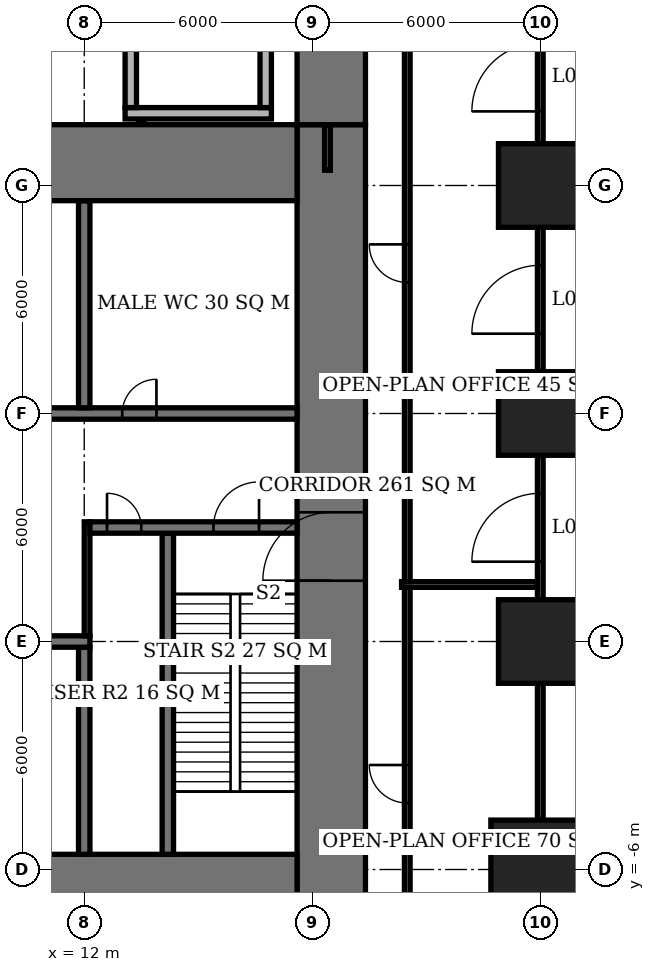
"""IFC4 building model, lengths in metres.
Left out: names, types, materials, properties, quantities, classifications, styles, units other than length and angle.
Written with IfcOpenShell. Run it as: python <this file> out.ifc"""

import sys

from ifc_helpers import new_model, si_unit, direction, frame, frame_2d, origin, origin_2d, place, context, subcontext, project, spatial, rectangle, extrude, element, fill, save


model = new_model("IFC4")
c1 = context("Model", 3, precision=1e-05, world=origin(), true_north=direction((0.0, 1.0)))
c2 = subcontext(c1, "Body", "Model", "MODEL_VIEW")
j1 = project(units=[si_unit("LENGTHUNIT", "METRE"), si_unit("PLANEANGLEUNIT", "RADIAN")], contexts=[c1])
p1 = place(None, origin())
s1 = spatial("IfcSite", under=j1, at=p1, CompositionType="ELEMENT")
p2 = place(p1, origin())
s2 = spatial("IfcBuilding", under=s1, at=p2, CompositionType="ELEMENT")
p3 = place(p2, frame((0.0, 0.0, 11.0)))
s3 = spatial("IfcBuildingStorey", under=s2, at=p3, CompositionType="ELEMENT", Elevation=11.0)
p4 = place(p3, frame((24.0, -6.0, 0.0), z_axis=(0.0, 0.0, 1.0), x_axis=(1.0, 0.0, 0.0)))
e1 = element("IfcColumn", 1, at=p4, inside=s3, PredefinedType="COLUMN", context=c2, shape_type="SweptSolid", body=[
    extrude(rectangle(XDim=2.6, YDim=2.6, at=origin_2d()), origin(), (0.0, 0.0, 1.0), 7.2),
])
for number, where, z_axis, x_axis in (
    (2, (24.0, 0.0, 0.0), (0.0, 0.0, 1.0), (1.0, 0.0, 0.0)),
    (3, (24.0, 6.0, 0.0), (0.0, 0.0, 1.0), (1.0, 0.0, 0.0)),
    (4, (24.0, 12.0, 0.0), (0.0, 0.0, 1.0), (1.0, 0.0, 0.0)),
):
    element("IfcColumn", number, at=place(p3, frame(where, z_axis=z_axis, x_axis=x_axis)), inside=s3, PredefinedType="COLUMN", context=c2, shape_type="SweptSolid", body=[
        extrude(rectangle(XDim=2.2, YDim=2.2, at=origin_2d()), origin(), (0.0, 0.0, 1.0), 7.2),
    ])
for number, where, z_axis, x_axis in (
    (5, (-5.6, -6.6, 0.0), (0.0, 0.0, 1.0), (1.0, 0.0, 0.0)),
    (6, (-5.6, 12.6, 0.0), (0.0, 0.0, 1.0), (1.0, 0.0, 0.0)),
):
    element("IfcWall", number, at=place(p3, frame(where, z_axis=z_axis, x_axis=x_axis)), inside=s3, PredefinedType="SHEAR", context=c2, shape_type="SweptSolid", body=[
        extrude(rectangle(XDim=23.2, YDim=2.0, at=frame_2d((11.6, 0.0))), origin(), (0.0, 0.0, 1.0), 7.2),
    ])
p5 = place(p3, frame((18.5, -7.6, 0.0), z_axis=(0.0, 0.0, 1.0), x_axis=(0.0, 1.0, 0.0)))
e7 = element("IfcWall", 7, at=p5, inside=s3, PredefinedType="SHEAR", context=c2, shape_type="SweptSolid", body=[
    extrude(rectangle(XDim=21.2, YDim=1.8, at=frame_2d((10.6, 0.0))), origin(), (0.0, 0.0, 1.0), 7.2),
])
p6 = place(p5, frame((9.2, 0.0, 0.0)))
e8 = element("IfcOpeningElement", 8, at=p6, cuts=e7, PredefinedType="OPENING", context=c2, shape_type="SweptSolid", body=[
    extrude(rectangle(XDim=1.8, YDim=2.4, at=frame_2d((0.9, 1.2))), frame((0.0, 0.91, 0.0), z_axis=(0.0, -1.0, 0.0), x_axis=(1.0, 0.0, 0.0)), (0.0, 0.0, 1.0), 1.82),
])
p7 = place(p3, frame((18.5, 13.6, 0.0), z_axis=(0.0, 0.0, 1.0), x_axis=(0.0, 1.0, 0.0)))
e9 = element("IfcWall", 9, at=p7, inside=s3, PredefinedType="SHEAR", context=c2, shape_type="SweptSolid", body=[
    extrude(rectangle(XDim=2.4, YDim=1.8, at=frame_2d((1.2, 0.0))), origin(), (0.0, 0.0, 1.0), 7.2),
])
p8 = place(p3, frame((-5.6, 0.0, 0.0), z_axis=(0.0, 0.0, 1.0), x_axis=(1.0, 0.0, 0.0)))
e10 = element("IfcWall", 10, at=p8, inside=s3, PredefinedType="SHEAR", context=c2, shape_type="SweptSolid", body=[
    extrude(rectangle(XDim=17.75, YDim=0.3, at=frame_2d((8.875, 0.0))), origin(), (0.0, 0.0, 1.0), 7.2),
])
p9 = place(p8, frame((0.6, 0.0, 0.0)))
e11 = element("IfcOpeningElement", 11, at=p9, cuts=e10, PredefinedType="OPENING", context=c2, shape_type="SweptSolid", body=[
    extrude(rectangle(XDim=0.9, YDim=2.1, at=frame_2d((0.45, 1.05))), frame((0.0, 0.16, 0.0), z_axis=(0.0, -1.0, 0.0), x_axis=(1.0, 0.0, 0.0)), (0.0, 0.0, 1.0), 0.32),
])
p10 = place(p8, frame((3.7, 0.0, 0.0)))
e12 = element("IfcOpeningElement", 12, at=p10, cuts=e10, PredefinedType="OPENING", context=c2, shape_type="SweptSolid", body=[
    extrude(rectangle(XDim=1.0, YDim=2.1, at=frame_2d((0.5, 1.05))), frame((0.0, 0.16, 0.0), z_axis=(0.0, -1.0, 0.0), x_axis=(1.0, 0.0, 0.0)), (0.0, 0.0, 1.0), 0.32),
])
p11 = place(p3, frame((12.15, 3.0, 0.0), z_axis=(0.0, 0.0, 1.0), x_axis=(1.0, 0.0, 0.0)))
e13 = element("IfcWall", 13, at=p11, inside=s3, PredefinedType="SHEAR", context=c2, shape_type="SweptSolid", body=[
    extrude(rectangle(XDim=5.45, YDim=0.3, at=frame_2d((2.725, 0.0))), origin(), (0.0, 0.0, 1.0), 7.2),
])
p12 = place(p11, frame((3.25, 0.0, 0.0)))
e14 = element("IfcOpeningElement", 14, at=p12, cuts=e13, PredefinedType="OPENING", context=c2, shape_type="SweptSolid", body=[
    extrude(rectangle(XDim=1.2, YDim=2.1, at=frame_2d((0.6, 1.05))), frame((0.0, 0.16, 0.0), z_axis=(0.0, -1.0, 0.0), x_axis=(1.0, 0.0, 0.0)), (0.0, 0.0, 1.0), 0.32),
])
p13 = place(p11, frame((0.45, 0.0, 0.0)))
e15 = element("IfcOpeningElement", 15, at=p13, cuts=e13, PredefinedType="OPENING", context=c2, shape_type="SweptSolid", body=[
    extrude(rectangle(XDim=0.9, YDim=2.1, at=frame_2d((0.45, 1.05))), frame((0.0, 0.16, 0.0), z_axis=(0.0, -1.0, 0.0), x_axis=(1.0, 0.0, 0.0)), (0.0, 0.0, 1.0), 0.32),
])
p14 = place(p3, frame((-0.15, 6.0, 0.0), z_axis=(0.0, 0.0, 1.0), x_axis=(1.0, 0.0, 0.0)))
e16 = element("IfcWall", 16, at=p14, inside=s3, PredefinedType="SHEAR", context=c2, shape_type="SweptSolid", body=[
    extrude(rectangle(XDim=17.75, YDim=0.3, at=frame_2d((8.875, 0.0))), origin(), (0.0, 0.0, 1.0), 7.2),
])
p15 = place(p14, frame((13.15, 0.0, 0.0)))
e17 = element("IfcOpeningElement", 17, at=p15, cuts=e16, PredefinedType="OPENING", context=c2, shape_type="SweptSolid", body=[
    extrude(rectangle(XDim=0.9, YDim=2.1, at=frame_2d((0.45, 1.05))), frame((0.0, 0.16, 0.0), z_axis=(0.0, -1.0, 0.0), x_axis=(1.0, 0.0, 0.0)), (0.0, 0.0, 1.0), 0.32),
])
p16 = place(p14, frame((1.1, 0.0, 0.0)))
e18 = element("IfcOpeningElement", 18, at=p16, cuts=e16, PredefinedType="OPENING", context=c2, shape_type="SweptSolid", body=[
    extrude(rectangle(XDim=1.1, YDim=2.1, at=frame_2d((0.55, 1.05))), frame((0.0, 0.16, 0.0), z_axis=(0.0, -1.0, 0.0), x_axis=(1.0, 0.0, 0.0)), (0.0, 0.0, 1.0), 0.32),
])
p17 = place(p14, frame((4.1, 0.0, 0.0)))
e19 = element("IfcOpeningElement", 19, at=p17, cuts=e16, PredefinedType="OPENING", context=c2, shape_type="SweptSolid", body=[
    extrude(rectangle(XDim=1.1, YDim=2.1, at=frame_2d((0.55, 1.05))), frame((0.0, 0.16, 0.0), z_axis=(0.0, -1.0, 0.0), x_axis=(1.0, 0.0, 0.0)), (0.0, 0.0, 1.0), 0.32),
])
p18 = place(p14, frame((7.1, 0.0, 0.0)))
e20 = element("IfcOpeningElement", 20, at=p18, cuts=e16, PredefinedType="OPENING", context=c2, shape_type="SweptSolid", body=[
    extrude(rectangle(XDim=1.1, YDim=2.1, at=frame_2d((0.55, 1.05))), frame((0.0, 0.16, 0.0), z_axis=(0.0, -1.0, 0.0), x_axis=(1.0, 0.0, 0.0)), (0.0, 0.0, 1.0), 0.32),
])
p19 = place(p14, frame((10.1, 0.0, 0.0)))
e21 = element("IfcOpeningElement", 21, at=p19, cuts=e16, PredefinedType="OPENING", context=c2, shape_type="SweptSolid", body=[
    extrude(rectangle(XDim=1.1, YDim=2.1, at=frame_2d((0.55, 1.05))), frame((0.0, 0.16, 0.0), z_axis=(0.0, -1.0, 0.0), x_axis=(1.0, 0.0, 0.0)), (0.0, 0.0, 1.0), 0.32),
])
for number, where, z_axis, x_axis in (
    (22, (12.0, -5.6, 0.0), (0.0, 0.0, 1.0), (0.0, 1.0, 0.0)),
    (23, (12.0, 6.15, 0.0), (0.0, 0.0, 1.0), (0.0, 1.0, 0.0)),
):
    element("IfcWall", number, at=place(p3, frame(where, z_axis=z_axis, x_axis=x_axis)), inside=s3, PredefinedType="SHEAR", context=c2, shape_type="SweptSolid", body=[
        extrude(rectangle(XDim=5.45, YDim=0.3, at=frame_2d((2.725, 0.0))), origin(), (0.0, 0.0, 1.0), 7.2),
    ])
p20 = place(p3, frame((14.2, -5.6, 0.0), z_axis=(0.0, 0.0, 1.0), x_axis=(0.0, 1.0, 0.0)))
e24 = element("IfcWall", 24, at=p20, inside=s3, PredefinedType="SHEAR", context=c2, shape_type="SweptSolid", body=[
    extrude(rectangle(XDim=8.45, YDim=0.3, at=frame_2d((4.225, 0.0))), origin(), (0.0, 0.0, 1.0), 7.2),
])
p21 = place(p3, frame((13.075, 13.9, 0.0), z_axis=(0.0, 0.0, 1.0), x_axis=(1.0, 0.0, 0.0)))
e25 = element("IfcWall", 25, at=p21, inside=s3, PredefinedType="PARTITIONING", context=c2, shape_type="SweptSolid", body=[
    extrude(rectangle(XDim=3.85, YDim=0.3, at=frame_2d((1.925, 0.0))), origin(), (0.0, 0.0, 1.0), 6.95),
])
for number, where, z_axis, x_axis in (
    (26, (13.225, 14.05, 0.0), (0.0, 0.0, 1.0), (0.0, 1.0, 0.0)),
    (27, (16.775, 14.05, 0.0), (0.0, 0.0, 1.0), (0.0, 1.0, 0.0)),
):
    element("IfcWall", number, at=place(p3, frame(where, z_axis=z_axis, x_axis=x_axis)), inside=s3, PredefinedType="PARTITIONING", context=c2, shape_type="SweptSolid", body=[
        extrude(rectangle(XDim=8.0, YDim=0.3, at=frame_2d((4.0, 0.0))), origin(), (0.0, 0.0, 1.0), 6.95),
    ])
p22 = place(p3, frame((24.0, -4.7, 0.0), z_axis=(0.0, 0.0, 1.0), x_axis=(0.0, 1.0, 0.0)))
e28 = element("IfcWall", 28, at=p22, inside=s3, PredefinedType="PARTITIONING", context=c2, shape_type="SweptSolid", body=[
    extrude(rectangle(XDim=3.6, YDim=0.15, at=frame_2d((1.8, 0.0))), origin(), (0.0, 0.0, 1.0), 6.8),
])
p23 = place(p3, frame((24.0, 1.1, 0.0), z_axis=(0.0, 0.0, 1.0), x_axis=(0.0, 1.0, 0.0)))
e29 = element("IfcWall", 29, at=p23, inside=s3, PredefinedType="PARTITIONING", context=c2, shape_type="SweptSolid", body=[
    extrude(rectangle(XDim=3.8, YDim=0.15, at=frame_2d((1.9, 0.0))), origin(), (0.0, 0.0, 1.0), 6.8),
])
p24 = place(p23, frame((1.0, 0.0, 0.0)))
e30 = element("IfcOpeningElement", 30, at=p24, cuts=e29, PredefinedType="OPENING", context=c2, shape_type="SweptSolid", body=[
    extrude(rectangle(XDim=1.8, YDim=2.4, at=frame_2d((0.9, 1.2))), frame((0.0, 0.085, 0.0), z_axis=(0.0, -1.0, 0.0), x_axis=(1.0, 0.0, 0.0)), (0.0, 0.0, 1.0), 0.17),
])
p25 = place(p3, frame((24.0, 7.1, 0.0), z_axis=(0.0, 0.0, 1.0), x_axis=(0.0, 1.0, 0.0)))
e31 = element("IfcWall", 31, at=p25, inside=s3, PredefinedType="PARTITIONING", context=c2, shape_type="SweptSolid", body=[
    extrude(rectangle(XDim=3.8, YDim=0.15, at=frame_2d((1.9, 0.0))), origin(), (0.0, 0.0, 1.0), 6.8),
])
p26 = place(p25, frame((1.0, 0.0, 0.0)))
e32 = element("IfcOpeningElement", 32, at=p26, cuts=e31, PredefinedType="OPENING", context=c2, shape_type="SweptSolid", body=[
    extrude(rectangle(XDim=1.8, YDim=2.4, at=frame_2d((0.9, 1.2))), frame((0.0, 0.085, 0.0), z_axis=(0.0, -1.0, 0.0), x_axis=(1.0, 0.0, 0.0)), (0.0, 0.0, 1.0), 0.17),
])
p27 = place(p3, frame((24.0, 13.1, 0.0), z_axis=(0.0, 0.0, 1.0), x_axis=(0.0, 1.0, 0.0)))
e33 = element("IfcWall", 33, at=p27, inside=s3, PredefinedType="PARTITIONING", context=c2, shape_type="SweptSolid", body=[
    extrude(rectangle(XDim=3.5, YDim=0.15, at=frame_2d((1.75, 0.0))), origin(), (0.0, 0.0, 1.0), 6.8),
])
p28 = place(p27, frame((0.85, 0.0, 0.0)))
e34 = element("IfcOpeningElement", 34, at=p28, cuts=e33, PredefinedType="OPENING", context=c2, shape_type="SweptSolid", body=[
    extrude(rectangle(XDim=1.8, YDim=2.4, at=frame_2d((0.9, 1.2))), frame((0.0, 0.085, 0.0), z_axis=(0.0, -1.0, 0.0), x_axis=(1.0, 0.0, 0.0)), (0.0, 0.0, 1.0), 0.17),
])
p29 = place(p3, frame((13.5, 12.4, 0.0), z_axis=(0.0, 0.0, 1.0), x_axis=(0.0, 1.0, 0.0)))
e35 = element("IfcWall", 35, at=p29, inside=s3, PredefinedType="PARTITIONING", context=c2, shape_type="SweptSolid", body=[
    extrude(rectangle(XDim=1.35, YDim=0.15, at=frame_2d((0.675, 0.0))), origin(), (0.0, 0.0, 1.0), 6.95),
])
p30 = place(p3, frame((18.4, 12.4, 0.0), z_axis=(0.0, 0.0, 1.0), x_axis=(0.0, 1.0, 0.0)))
e36 = element("IfcWall", 36, at=p30, inside=s3, PredefinedType="PARTITIONING", context=c2, shape_type="SweptSolid", body=[
    extrude(rectangle(XDim=1.2, YDim=0.15, at=frame_2d((0.6, 0.0))), origin(), (0.0, 0.0, 1.0), 6.95),
])
p31 = place(p3, frame((20.5, -13.425, 0.0), z_axis=(0.0, 0.0, 1.0), x_axis=(0.0, 1.0, 0.0)))
e37 = element("IfcWall", 37, at=p31, inside=s3, PredefinedType="PARTITIONING", context=c2, shape_type="SweptSolid", body=[
    extrude(rectangle(XDim=14.85, YDim=0.15, at=frame_2d((7.425, 0.0))), origin(), (0.0, 0.0, 1.0), 6.95),
])
p32 = place(p31, frame((9.175, 0.0, 0.0)))
e38 = element("IfcOpeningElement", 38, at=p32, cuts=e37, PredefinedType="OPENING", context=c2, shape_type="SweptSolid", body=[
    extrude(rectangle(XDim=1.0, YDim=2.1, at=frame_2d((0.5, 1.05))), frame((0.0, 0.085, 0.0), z_axis=(0.0, -1.0, 0.0), x_axis=(1.0, 0.0, 0.0)), (0.0, 0.0, 1.0), 0.17),
])
p33 = place(p3, frame((20.5, 1.575, 0.0), z_axis=(0.0, 0.0, 1.0), x_axis=(0.0, 1.0, 0.0)))
e39 = element("IfcWall", 39, at=p33, inside=s3, PredefinedType="PARTITIONING", context=c2, shape_type="SweptSolid", body=[
    extrude(rectangle(XDim=14.95, YDim=0.15, at=frame_2d((7.475, 0.0))), origin(), (0.0, 0.0, 1.0), 6.95),
])
p34 = place(p33, frame((7.875, 0.0, 0.0)))
e40 = element("IfcOpeningElement", 40, at=p34, cuts=e39, PredefinedType="OPENING", context=c2, shape_type="SweptSolid", body=[
    extrude(rectangle(XDim=1.0, YDim=2.1, at=frame_2d((0.5, 1.05))), frame((0.0, 0.085, 0.0), z_axis=(0.0, -1.0, 0.0), x_axis=(1.0, 0.0, 0.0)), (0.0, 0.0, 1.0), 0.17),
])
p35 = place(p3, frame((20.35, 1.5, 0.0), z_axis=(0.0, 0.0, 1.0), x_axis=(1.0, 0.0, 0.0)))
e41 = element("IfcWall", 41, at=p35, inside=s3, PredefinedType="PARTITIONING", context=c2, shape_type="SweptSolid", body=[
    extrude(rectangle(XDim=3.575, YDim=0.15, at=frame_2d((1.788, 0.0))), origin(), (0.0, 0.0, 1.0), 6.95),
])
p36 = place(p3, frame((12.075, 0.15, 0.0), z_axis=(0.0, 0.0, 1.0), x_axis=(0.0, 1.0, 0.0)))
e42 = element("IfcWall", 42, at=p36, inside=s3, PredefinedType="PARTITIONING", context=c2, shape_type="SweptSolid", body=[
    extrude(rectangle(XDim=3.0, YDim=0.15, at=frame_2d((1.5, 0.0))), origin(), (0.0, 0.0, 1.0), 6.95),
])
p37 = place(p6, origin())
e43 = element("IfcDoor", 43, at=p37, inside=s3, OperationType="DOUBLE_DOOR_SINGLE_SWING", PredefinedType="DOOR", context=c2, shape_type="SweptSolid", body=[
    extrude(rectangle(XDim=1.8, YDim=2.4, at=frame_2d((0.9, 1.2))), frame((0.0, 0.025, 0.0), z_axis=(0.0, -1.0, 0.0), x_axis=(1.0, 0.0, 0.0)), (0.0, 0.0, 1.0), 0.05),
])
fill(e8, e43)
p38 = place(p12, origin())
e44 = element("IfcDoor", 44, at=p38, inside=s3, OperationType="SINGLE_SWING_RIGHT", PredefinedType="DOOR", context=c2, shape_type="SweptSolid", body=[
    extrude(rectangle(XDim=1.2, YDim=2.1, at=frame_2d((0.6, 1.05))), frame((0.0, 0.025, 0.0), z_axis=(0.0, -1.0, 0.0), x_axis=(1.0, 0.0, 0.0)), (0.0, 0.0, 1.0), 0.05),
])
fill(e14, e44)
p39 = place(p13, origin())
e45 = element("IfcDoor", 45, at=p39, inside=s3, OperationType="SINGLE_SWING_LEFT", PredefinedType="DOOR", context=c2, shape_type="SweptSolid", body=[
    extrude(rectangle(XDim=0.9, YDim=2.1, at=frame_2d((0.45, 1.05))), frame((0.0, 0.025, 0.0), z_axis=(0.0, -1.0, 0.0), x_axis=(1.0, 0.0, 0.0)), (0.0, 0.0, 1.0), 0.05),
])
fill(e15, e45)
p40 = place(p15, origin())
e46 = element("IfcDoor", 46, at=p40, inside=s3, OperationType="SINGLE_SWING_RIGHT", PredefinedType="DOOR", context=c2, shape_type="SweptSolid", body=[
    extrude(rectangle(XDim=0.9, YDim=2.1, at=frame_2d((0.45, 1.05))), frame((0.0, 0.025, 0.0), z_axis=(0.0, -1.0, 0.0), x_axis=(1.0, 0.0, 0.0)), (0.0, 0.0, 1.0), 0.05),
])
fill(e17, e46)
p41 = place(p24, origin())
e47 = element("IfcDoor", 47, at=p41, inside=s3, OperationType="DOUBLE_DOOR_SINGLE_SWING", PredefinedType="DOOR", context=c2, shape_type="SweptSolid", body=[
    extrude(rectangle(XDim=1.8, YDim=2.4, at=frame_2d((0.9, 1.2))), frame((0.0, 0.025, 0.0), z_axis=(0.0, -1.0, 0.0), x_axis=(1.0, 0.0, 0.0)), (0.0, 0.0, 1.0), 0.05),
])
fill(e30, e47)
p42 = place(p26, origin())
e48 = element("IfcDoor", 48, at=p42, inside=s3, OperationType="DOUBLE_DOOR_SINGLE_SWING", PredefinedType="DOOR", context=c2, shape_type="SweptSolid", body=[
    extrude(rectangle(XDim=1.8, YDim=2.4, at=frame_2d((0.9, 1.2))), frame((0.0, 0.025, 0.0), z_axis=(0.0, -1.0, 0.0), x_axis=(1.0, 0.0, 0.0)), (0.0, 0.0, 1.0), 0.05),
])
fill(e32, e48)
p43 = place(p28, origin())
e49 = element("IfcDoor", 49, at=p43, inside=s3, OperationType="DOUBLE_DOOR_SINGLE_SWING", PredefinedType="DOOR", context=c2, shape_type="SweptSolid", body=[
    extrude(rectangle(XDim=1.8, YDim=2.4, at=frame_2d((0.9, 1.2))), frame((0.0, 0.025, 0.0), z_axis=(0.0, -1.0, 0.0), x_axis=(1.0, 0.0, 0.0)), (0.0, 0.0, 1.0), 0.05),
])
fill(e34, e49)
p44 = place(p32, origin())
e50 = element("IfcDoor", 50, at=p44, inside=s3, OperationType="SINGLE_SWING_RIGHT", PredefinedType="DOOR", context=c2, shape_type="SweptSolid", body=[
    extrude(rectangle(XDim=1.0, YDim=2.1, at=frame_2d((0.5, 1.05))), frame((0.0, 0.025, 0.0), z_axis=(0.0, -1.0, 0.0), x_axis=(1.0, 0.0, 0.0)), (0.0, 0.0, 1.0), 0.05),
])
fill(e38, e50)
p45 = place(p34, origin())
e51 = element("IfcDoor", 51, at=p45, inside=s3, OperationType="SINGLE_SWING_RIGHT", PredefinedType="DOOR", context=c2, shape_type="SweptSolid", body=[
    extrude(rectangle(XDim=1.0, YDim=2.1, at=frame_2d((0.5, 1.05))), frame((0.0, 0.025, 0.0), z_axis=(0.0, -1.0, 0.0), x_axis=(1.0, 0.0, 0.0)), (0.0, 0.0, 1.0), 0.05),
])
fill(e40, e51)
save(model, sys.argv[1])
